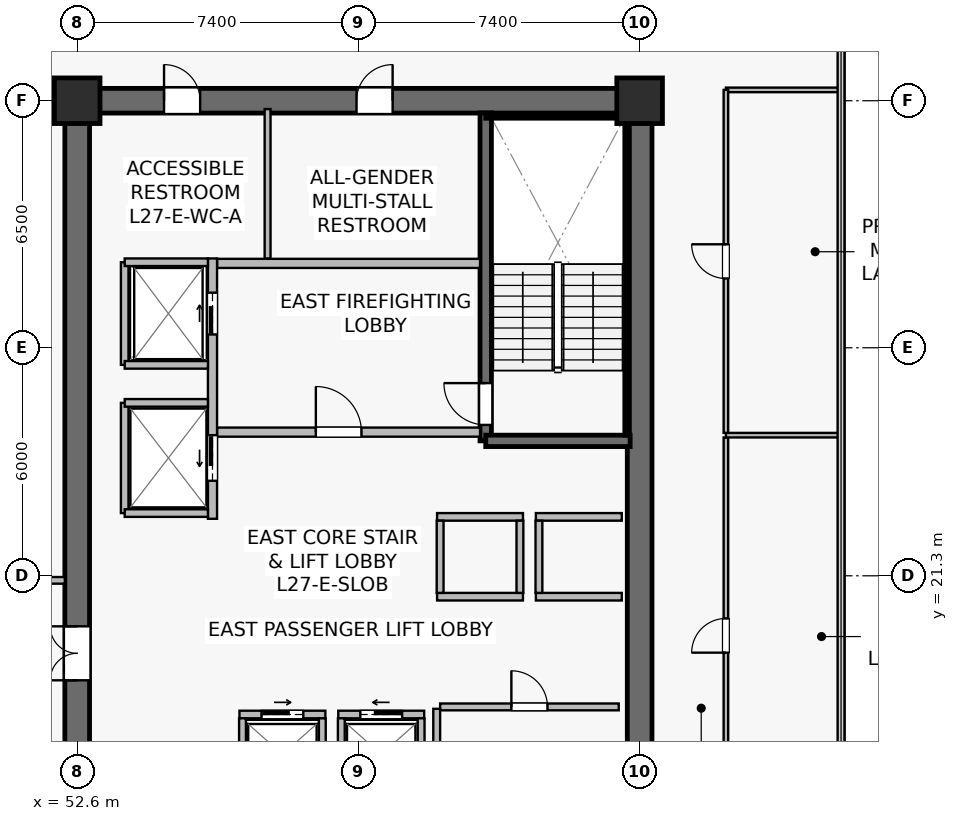
"""IFC4 building model, lengths in metres.
Left out: names, types, materials, properties, quantities, classifications, styles, units other than length and angle.
Written with IfcOpenShell. Run it as: python <this file> out.ifc"""

import sys

from ifc_helpers import new_model, si_unit, direction, frame, frame_2d, origin, origin_2d, place, context, subcontext, project, spatial, rectangle, extrude, source, transform, mapped, element, fill, save


model = new_model("IFC4")
c1 = context("Model", 3, precision=1e-05, world=origin(), true_north=direction((0.0, 1.0)))
c2 = subcontext(c1, "Body", "Model", "MODEL_VIEW")
j1 = project(units=[si_unit("LENGTHUNIT", "METRE"), si_unit("PLANEANGLEUNIT", "RADIAN")], contexts=[c1])
p1 = place(None, origin())
s1 = spatial("IfcSite", under=j1, at=p1, CompositionType="ELEMENT")
p2 = place(p1, origin())
s2 = spatial("IfcBuilding", under=s1, at=p2, CompositionType="ELEMENT")
p3 = place(p2, frame((0.0, 0.0, 113.3)))
s3 = spatial("IfcBuildingStorey", under=s2, at=p3, CompositionType="ELEMENT", Elevation=113.3)
p4 = place(p3, frame((52.275, 33.8, 0.0), z_axis=(0.0, 0.0, 1.0), x_axis=(1.0, 0.0, 0.0)))
e1 = element("IfcWall", 1, at=p4, inside=s3, PredefinedType="SHEAR", context=c2, shape_type="SweptSolid", body=[
    extrude(rectangle(XDim=15.45, YDim=0.65, at=frame_2d((7.725, 0.0))), origin(), (0.0, 0.0, 1.0), 3.79),
])
p5 = place(p4, frame((7.675, 0.0, 0.0)))
e2 = element("IfcOpeningElement", 2, at=p5, cuts=e1, PredefinedType="OPENING", context=c2, shape_type="SweptSolid", body=[
    extrude(rectangle(XDim=0.95, YDim=2.15, at=frame_2d((0.475, 1.075))), frame((0.0, 0.335, 0.0), z_axis=(0.0, -1.0, 0.0), x_axis=(1.0, 0.0, 0.0)), (0.0, 0.0, 1.0), 0.67),
])
p6 = place(p4, frame((2.61, 0.0, 0.0)))
e3 = element("IfcOpeningElement", 3, at=p6, cuts=e1, PredefinedType="OPENING", context=c2, shape_type="SweptSolid", body=[
    extrude(rectangle(XDim=0.95, YDim=2.15, at=frame_2d((0.475, 1.075))), frame((0.0, 0.335, 0.0), z_axis=(0.0, -1.0, 0.0), x_axis=(1.0, 0.0, 0.0)), (0.0, 0.0, 1.0), 0.67),
])
p7 = place(p3, frame((52.6, 15.125, 0.0), z_axis=(0.0, 0.0, 1.0), x_axis=(0.0, 1.0, 0.0)))
e4 = element("IfcWall", 4, at=p7, inside=s3, PredefinedType="SHEAR", context=c2, shape_type="SweptSolid", body=[
    extrude(rectangle(XDim=18.35, YDim=0.65, at=frame_2d((9.175, 0.0))), origin(), (0.0, 0.0, 1.0), 3.79),
])
p8 = place(p7, frame((3.425, 0.0, 0.0)))
e5 = element("IfcOpeningElement", 5, at=p8, cuts=e4, PredefinedType="OPENING", context=c2, shape_type="SweptSolid", body=[
    extrude(rectangle(XDim=1.42, YDim=2.2, at=frame_2d((0.71, 1.1))), frame((0.0, 0.335, 0.0), z_axis=(0.0, -1.0, 0.0), x_axis=(1.0, 0.0, 0.0)), (0.0, 0.0, 1.0), 0.67),
])
p9 = place(p3, frame((67.4, 15.125, 0.0), z_axis=(0.0, 0.0, 1.0), x_axis=(0.0, 1.0, 0.0)))
e6 = element("IfcWall", 6, at=p9, inside=s3, PredefinedType="SHEAR", context=c2, shape_type="SweptSolid", body=[
    extrude(rectangle(XDim=18.35, YDim=0.65, at=frame_2d((9.175, 0.0))), origin(), (0.0, 0.0, 1.0), 3.79),
])
p10 = place(p3, frame((63.35, 24.85, 0.0), z_axis=(0.0, 0.0, 1.0), x_axis=(0.0, 1.0, 0.0)))
e7 = element("IfcWall", 7, at=p10, inside=s3, PredefinedType="SHEAR", context=c2, shape_type="SweptSolid", body=[
    extrude(rectangle(XDim=8.63, YDim=0.3, at=frame_2d((4.315, 0.0))), origin(), (0.0, 0.0, 1.0), 3.79),
])
p11 = place(p10, frame((0.42, 0.0, 0.0)))
e8 = element("IfcOpeningElement", 8, at=p11, cuts=e7, PredefinedType="OPENING", context=c2, shape_type="SweptSolid", body=[
    extrude(rectangle(XDim=1.1, YDim=2.15, at=frame_2d((0.55, 1.075))), frame((0.0, 0.16, 0.0), z_axis=(0.0, -1.0, 0.0), x_axis=(1.0, 0.0, 0.0)), (0.0, 0.0, 1.0), 0.32),
])
p12 = place(p3, frame((63.35, 24.85, 0.0), z_axis=(0.0, 0.0, 1.0), x_axis=(1.0, 0.0, 0.0)))
e9 = element("IfcWall", 9, at=p12, inside=s3, PredefinedType="SHEAR", context=c2, shape_type="SweptSolid", body=[
    extrude(rectangle(XDim=3.8, YDim=0.3, at=frame_2d((1.9, 0.0))), origin(), (0.0, 0.0, 1.0), 3.79),
])
p13 = place(p3, frame((63.35, 33.4, 0.0), z_axis=(0.0, 0.0, 1.0), x_axis=(1.0, 0.0, 0.0)))
e10 = element("IfcWall", 10, at=p13, inside=s3, PredefinedType="SOLIDWALL", context=c2, shape_type="SweptSolid", body=[
    extrude(rectangle(XDim=3.72, YDim=0.12, at=frame_2d((1.86, 0.0))), origin(), (0.0, 0.0, 1.0), 3.79),
])
p14 = place(p3, frame((67.07, 25.0, 0.0), z_axis=(0.0, 0.0, 1.0), x_axis=(0.0, 1.0, 0.0)))
e11 = element("IfcWall", 11, at=p14, inside=s3, PredefinedType="SOLIDWALL", context=c2, shape_type="SweptSolid", body=[
    extrude(rectangle(XDim=8.32, YDim=0.12, at=frame_2d((4.16, 0.0))), origin(), (0.0, 0.0, 1.0), 3.79),
])
m1 = source(origin(), c2, "Body", "SweptSolid", [
    extrude(rectangle(XDim=1.2, YDim=1.2, at=origin_2d()), origin(), (0.0, 0.0, 1.0), 4.1),
])
for number, where, z_axis, x_axis in (
    (12, (52.6, 33.8, 0.0), (0.0, 0.0, 1.0), (1.0, 0.0, 0.0)),
    (13, (67.4, 33.8, 0.0), (0.0, 0.0, 1.0), (1.0, 0.0, 0.0)),
):
    element("IfcColumn", number, at=place(p3, frame(where, z_axis=z_axis, x_axis=x_axis)), inside=s3, PredefinedType="COLUMN", context=c2, shape_type="MappedRepresentation", body=[
        mapped(m1, transform((0.0, 0.0, 0.0), scale=1.0)),
    ])
p15 = place(p3, frame((56.28, 25.08, 0.0), z_axis=(0.0, 0.0, 1.0), x_axis=(1.0, 0.0, 0.0)))
e14 = element("IfcWall", 14, at=p15, inside=s3, PredefinedType="SOLIDWALL", context=c2, shape_type="SweptSolid", body=[
    extrude(rectangle(XDim=6.92, YDim=0.24, at=frame_2d((3.46, 0.0))), origin(), (0.0, 0.0, 1.0), 3.125),
])
p16 = place(p15, frame((2.6, 0.0, 0.0)))
e15 = element("IfcOpeningElement", 15, at=p16, cuts=e14, PredefinedType="OPENING", context=c2, shape_type="SweptSolid", body=[
    extrude(rectangle(XDim=1.2, YDim=2.16, at=frame_2d((0.6, 1.08))), frame((0.0, 0.13, 0.0), z_axis=(0.0, -1.0, 0.0), x_axis=(1.0, 0.0, 0.0)), (0.0, 0.0, 1.0), 0.26),
])
p17 = place(p3, frame((56.28, 29.52, 0.0), z_axis=(0.0, 0.0, 1.0), x_axis=(1.0, 0.0, 0.0)))
e16 = element("IfcWall", 16, at=p17, inside=s3, PredefinedType="SOLIDWALL", context=c2, shape_type="SweptSolid", body=[
    extrude(rectangle(XDim=6.92, YDim=0.24, at=frame_2d((3.46, 0.0))), origin(), (0.0, 0.0, 1.0), 3.125),
])
p18 = place(p3, frame((56.16, 22.8, 0.0), z_axis=(0.0, 0.0, 1.0), x_axis=(0.0, 1.0, 0.0)))
e17 = element("IfcWall", 17, at=p18, inside=s3, PredefinedType="SOLIDWALL", context=c2, shape_type="SweptSolid", body=[
    extrude(rectangle(XDim=6.85, YDim=0.24, at=frame_2d((3.425, 0.0))), origin(), (0.0, 0.0, 1.0), 2.875),
])
p19 = place(p18, frame((4.85, 0.0, 0.0)))
e18 = element("IfcOpeningElement", 18, at=p19, cuts=e17, PredefinedType="OPENING", context=c2, shape_type="SweptSolid", body=[
    extrude(rectangle(XDim=1.1, YDim=2.22, at=frame_2d((0.55, 1.11))), frame((0.0, 0.13, 0.0), z_axis=(0.0, -1.0, 0.0), x_axis=(1.0, 0.0, 0.0)), (0.0, 0.0, 1.0), 0.26),
])
p20 = place(p18, frame((1.0, 0.0, 0.0)))
e19 = element("IfcOpeningElement", 19, at=p20, cuts=e17, PredefinedType="OPENING", context=c2, shape_type="SweptSolid", body=[
    extrude(rectangle(XDim=1.2, YDim=2.22, at=frame_2d((0.6, 1.11))), frame((0.0, 0.13, 0.0), z_axis=(0.0, -1.0, 0.0), x_axis=(1.0, 0.0, 0.0)), (0.0, 0.0, 1.0), 0.26),
])
p21 = place(p3, frame((59.47, 17.65, 0.0), z_axis=(0.0, 0.0, 1.0), x_axis=(1.0, 0.0, 0.0)))
e20 = element("IfcWall", 20, at=p21, inside=s3, PredefinedType="SOLIDWALL", context=c2, shape_type="SweptSolid", body=[
    extrude(rectangle(XDim=2.26, YDim=0.2, at=frame_2d((1.13, 0.0))), origin(), (0.0, 0.0, 1.0), 3.125),
])
p22 = place(p21, frame((0.58, 0.0, 0.0)))
e21 = element("IfcOpeningElement", 21, at=p22, cuts=e20, PredefinedType="OPENING", context=c2, shape_type="SweptSolid", body=[
    extrude(rectangle(XDim=1.1, YDim=2.22, at=frame_2d((0.55, 1.11))), frame((0.0, 0.11, 0.0), z_axis=(0.0, -1.0, 0.0), x_axis=(1.0, 0.0, 0.0)), (0.0, 0.0, 1.0), 0.22),
])
for number, where, z_axis, x_axis in (
    (22, (59.55, 15.65, 0.0), (0.0, 0.0, 1.0), (0.0, 1.0, 0.0)),
    (23, (61.65, 15.65, 0.0), (0.0, 0.0, 1.0), (0.0, 1.0, 0.0)),
):
    element("IfcWall", number, at=place(p3, frame(where, z_axis=z_axis, x_axis=x_axis)), inside=s3, PredefinedType="SOLIDWALL", context=c2, shape_type="SweptSolid", body=[
        extrude(rectangle(XDim=1.9, YDim=0.18, at=frame_2d((0.95, 0.0))), origin(), (0.0, 0.0, 1.0), 3.79),
    ])
p23 = place(p3, frame((56.87, 17.65, 0.0), z_axis=(0.0, 0.0, 1.0), x_axis=(1.0, 0.0, 0.0)))
e24 = element("IfcWall", 24, at=p23, inside=s3, PredefinedType="SOLIDWALL", context=c2, shape_type="SweptSolid", body=[
    extrude(rectangle(XDim=2.26, YDim=0.2, at=frame_2d((1.13, 0.0))), origin(), (0.0, 0.0, 1.0), 3.79),
])
p24 = place(p23, frame((0.58, 0.0, 0.0)))
e25 = element("IfcOpeningElement", 25, at=p24, cuts=e24, PredefinedType="OPENING", context=c2, shape_type="SweptSolid", body=[
    extrude(rectangle(XDim=1.1, YDim=2.22, at=frame_2d((0.55, 1.11))), frame((0.0, 0.11, 0.0), z_axis=(0.0, -1.0, 0.0), x_axis=(1.0, 0.0, 0.0)), (0.0, 0.0, 1.0), 0.22),
])
for number, where, z_axis, x_axis in (
    (26, (56.95, 15.65, 0.0), (0.0, 0.0, 1.0), (0.0, 1.0, 0.0)),
    (27, (59.05, 15.65, 0.0), (0.0, 0.0, 1.0), (0.0, 1.0, 0.0)),
):
    element("IfcWall", number, at=place(p3, frame(where, z_axis=z_axis, x_axis=x_axis)), inside=s3, PredefinedType="SOLIDWALL", context=c2, shape_type="SweptSolid", body=[
        extrude(rectangle(XDim=1.9, YDim=0.18, at=frame_2d((0.95, 0.0))), origin(), (0.0, 0.0, 1.0), 3.79),
    ])
for number, where, z_axis, x_axis in (
    (28, (64.67, 20.75, 0.0), (0.0, 0.0, 1.0), (1.0, 0.0, 0.0)),
    (29, (64.67, 22.85, 0.0), (0.0, 0.0, 1.0), (1.0, 0.0, 0.0)),
):
    element("IfcWall", number, at=place(p3, frame(where, z_axis=z_axis, x_axis=x_axis)), inside=s3, PredefinedType="SOLIDWALL", context=c2, shape_type="SweptSolid", body=[
        extrude(rectangle(XDim=2.26, YDim=0.2, at=frame_2d((1.13, 0.0))), origin(), (0.0, 0.0, 1.0), 3.79),
    ])
p25 = place(p3, frame((64.75, 20.85, 0.0), z_axis=(0.0, 0.0, 1.0), x_axis=(0.0, 1.0, 0.0)))
e30 = element("IfcWall", 30, at=p25, inside=s3, PredefinedType="SOLIDWALL", context=c2, shape_type="SweptSolid", body=[
    extrude(rectangle(XDim=1.9, YDim=0.18, at=frame_2d((0.95, 0.0))), origin(), (0.0, 0.0, 1.0), 3.79),
])
for number, where, z_axis, x_axis in (
    (31, (62.07, 20.75, 0.0), (0.0, 0.0, 1.0), (1.0, 0.0, 0.0)),
    (32, (62.07, 22.85, 0.0), (0.0, 0.0, 1.0), (1.0, 0.0, 0.0)),
):
    element("IfcWall", number, at=place(p3, frame(where, z_axis=z_axis, x_axis=x_axis)), inside=s3, PredefinedType="SOLIDWALL", context=c2, shape_type="SweptSolid", body=[
        extrude(rectangle(XDim=2.26, YDim=0.2, at=frame_2d((1.13, 0.0))), origin(), (0.0, 0.0, 1.0), 3.79),
    ])
for number, where, z_axis, x_axis in (
    (33, (62.15, 20.85, 0.0), (0.0, 0.0, 1.0), (0.0, 1.0, 0.0)),
    (34, (64.25, 20.85, 0.0), (0.0, 0.0, 1.0), (0.0, 1.0, 0.0)),
):
    element("IfcWall", number, at=place(p3, frame(where, z_axis=z_axis, x_axis=x_axis)), inside=s3, PredefinedType="SOLIDWALL", context=c2, shape_type="SweptSolid", body=[
        extrude(rectangle(XDim=1.9, YDim=0.18, at=frame_2d((0.95, 0.0))), origin(), (0.0, 0.0, 1.0), 3.79),
    ])
p26 = place(p3, frame((53.85, 26.85, 0.0), z_axis=(0.0, 0.0, 1.0), x_axis=(0.0, 1.0, 0.0)))
e35 = element("IfcWall", 35, at=p26, inside=s3, PredefinedType="SOLIDWALL", context=c2, shape_type="SweptSolid", body=[
    extrude(rectangle(XDim=2.7, YDim=0.2, at=frame_2d((1.35, 0.0))), origin(), (0.0, 0.0, 1.0), 3.79),
])
p27 = place(p3, frame((53.85, 29.55, 0.0), z_axis=(0.0, 0.0, 1.0), x_axis=(1.0, 0.0, 0.0)))
e36 = element("IfcWall", 36, at=p27, inside=s3, PredefinedType="SOLIDWALL", context=c2, shape_type="SweptSolid", body=[
    extrude(rectangle(XDim=2.19, YDim=0.2, at=frame_2d((1.095, 0.0))), origin(), (0.0, 0.0, 1.0), 3.79),
])
p28 = place(p3, frame((53.85, 26.85, 0.0), z_axis=(0.0, 0.0, 1.0), x_axis=(1.0, 0.0, 0.0)))
e37 = element("IfcWall", 37, at=p28, inside=s3, PredefinedType="SOLIDWALL", context=c2, shape_type="SweptSolid", body=[
    extrude(rectangle(XDim=2.19, YDim=0.2, at=frame_2d((1.095, 0.0))), origin(), (0.0, 0.0, 1.0), 3.187),
])
p29 = place(p3, frame((53.85, 22.95, 0.0), z_axis=(0.0, 0.0, 1.0), x_axis=(0.0, 1.0, 0.0)))
e38 = element("IfcWall", 38, at=p29, inside=s3, PredefinedType="SOLIDWALL", context=c2, shape_type="SweptSolid", body=[
    extrude(rectangle(XDim=2.9, YDim=0.2, at=frame_2d((1.45, 0.0))), origin(), (0.0, 0.0, 1.0), 2.875),
])
for number, where, z_axis, x_axis in (
    (39, (53.85, 25.85, 0.0), (0.0, 0.0, 1.0), (1.0, 0.0, 0.0)),
    (40, (53.85, 22.95, 0.0), (0.0, 0.0, 1.0), (1.0, 0.0, 0.0)),
):
    element("IfcWall", number, at=place(p3, frame(where, z_axis=z_axis, x_axis=x_axis)), inside=s3, PredefinedType="SOLIDWALL", context=c2, shape_type="SweptSolid", body=[
        extrude(rectangle(XDim=2.19, YDim=0.2, at=frame_2d((1.095, 0.0))), origin(), (0.0, 0.0, 1.0), 3.79),
    ])
p30 = place(p3, frame((62.15, 17.85, 0.0), z_axis=(0.0, 0.0, 1.0), x_axis=(1.0, 0.0, 0.0)))
e41 = element("IfcWall", 41, at=p30, inside=s3, PredefinedType="SOLIDWALL", context=c2, shape_type="SweptSolid", body=[
    extrude(rectangle(XDim=4.7, YDim=0.18, at=frame_2d((2.35, 0.0))), origin(), (0.0, 0.0, 1.0), 3.79),
])
p31 = place(p30, frame((1.875, 0.0, 0.0)))
e42 = element("IfcOpeningElement", 42, at=p31, cuts=e41, PredefinedType="OPENING", context=c2, shape_type="SweptSolid", body=[
    extrude(rectangle(XDim=0.95, YDim=2.15, at=frame_2d((0.475, 1.075))), frame((0.0, 0.1, 0.0), z_axis=(0.0, -1.0, 0.0), x_axis=(1.0, 0.0, 0.0)), (0.0, 0.0, 1.0), 0.2),
])
p32 = place(p3, frame((62.06, 15.4, 0.0), z_axis=(0.0, 0.0, 1.0), x_axis=(0.0, 1.0, 0.0)))
e43 = element("IfcWall", 43, at=p32, inside=s3, PredefinedType="SOLIDWALL", context=c2, shape_type="SweptSolid", body=[
    extrude(rectangle(XDim=2.4, YDim=0.18, at=frame_2d((1.2, 0.0))), origin(), (0.0, 0.0, 1.0), 3.79),
])
p33 = place(p3, frame((57.61, 29.65, 0.0), z_axis=(0.0, 0.0, 1.0), x_axis=(0.0, 1.0, 0.0)))
e44 = element("IfcWall", 44, at=p33, inside=s3, PredefinedType="PLUMBINGWALL", context=c2, shape_type="SweptSolid", body=[
    extrude(rectangle(XDim=3.93, YDim=0.155, at=frame_2d((1.965, 0.0))), origin(), (0.0, 0.0, 1.0), 3.79),
])
p34 = place(p3, frame((48.3, 34.26, 0.0), z_axis=(0.0, 0.0, 1.0), x_axis=(1.0, 0.0, 0.0)))
e45 = element("IfcWall", 45, at=p34, inside=s3, PredefinedType="PARTITIONING", context=c2, shape_type="SweptSolid", body=[
    extrude(rectangle(XDim=3.975, YDim=0.175, at=frame_2d((1.987, 0.0))), origin(), (0.0, 0.0, 1.0), 3.475),
])
p35 = place(p3, frame((48.3, 21.18, 0.0), z_axis=(0.0, 0.0, 1.0), x_axis=(1.0, 0.0, 0.0)))
e46 = element("IfcWall", 46, at=p35, inside=s3, PredefinedType="PARTITIONING", context=c2, shape_type="SweptSolid", body=[
    extrude(rectangle(XDim=3.975, YDim=0.175, at=frame_2d((1.987, 0.0))), origin(), (0.0, 0.0, 1.0), 3.79),
])
p36 = place(p35, frame((1.35, 0.0, 0.0)))
e47 = element("IfcOpeningElement", 47, at=p36, cuts=e46, PredefinedType="OPENING", context=c2, shape_type="SweptSolid", body=[
    extrude(rectangle(XDim=0.95, YDim=2.15, at=frame_2d((0.475, 1.075))), frame((0.0, 0.098, 0.0), z_axis=(0.0, -1.0, 0.0), x_axis=(1.0, 0.0, 0.0)), (0.0, 0.0, 1.0), 0.195),
])
p37 = place(p3, frame((69.67, 34.085, 0.0), z_axis=(0.0, 0.0, 1.0), x_axis=(1.0, 0.0, 0.0)))
e48 = element("IfcWall", 48, at=p37, inside=s3, PredefinedType="PARTITIONING", context=c2, shape_type="SweptSolid", body=[
    extrude(rectangle(XDim=3.02, YDim=0.12, at=frame_2d((1.51, 0.0))), origin(), (0.0, 0.0, 1.0), 3.79),
])
p38 = place(p3, frame((69.67, 14.515, 0.0), z_axis=(0.0, 0.0, 1.0), x_axis=(0.0, 1.0, 0.0)))
e49 = element("IfcWall", 49, at=p38, inside=s3, PredefinedType="PARTITIONING", context=c2, shape_type="SweptSolid", body=[
    extrude(rectangle(XDim=10.425, YDim=0.12, at=frame_2d((5.212, 0.0))), origin(), (0.0, 0.0, 1.0), 3.79),
])
p39 = place(p38, frame((4.762, 0.0, 0.0)))
e50 = element("IfcOpeningElement", 50, at=p39, cuts=e49, PredefinedType="OPENING", context=c2, shape_type="SweptSolid", body=[
    extrude(rectangle(XDim=0.9, YDim=2.1, at=frame_2d((0.45, 1.05))), frame((0.0, 0.07, 0.0), z_axis=(0.0, -1.0, 0.0), x_axis=(1.0, 0.0, 0.0)), (0.0, 0.0, 1.0), 0.14),
])
p40 = place(p3, frame((69.67, 25.0, 0.0), z_axis=(0.0, 0.0, 1.0), x_axis=(1.0, 0.0, 0.0)))
e51 = element("IfcWall", 51, at=p40, inside=s3, PredefinedType="PARTITIONING", context=c2, shape_type="SweptSolid", body=[
    extrude(rectangle(XDim=3.02, YDim=0.12, at=frame_2d((1.51, 0.0))), origin(), (0.0, 0.0, 1.0), 3.79),
])
p41 = place(p3, frame((69.67, 25.06, 0.0), z_axis=(0.0, 0.0, 1.0), x_axis=(0.0, 1.0, 0.0)))
e52 = element("IfcWall", 52, at=p41, inside=s3, PredefinedType="PARTITIONING", context=c2, shape_type="SweptSolid", body=[
    extrude(rectangle(XDim=9.025, YDim=0.12, at=frame_2d((4.512, 0.0))), origin(), (0.0, 0.0, 1.0), 3.79),
])
p42 = place(p41, frame((4.062, 0.0, 0.0)))
e53 = element("IfcOpeningElement", 53, at=p42, cuts=e52, PredefinedType="OPENING", context=c2, shape_type="SweptSolid", body=[
    extrude(rectangle(XDim=0.9, YDim=2.1, at=frame_2d((0.45, 1.05))), frame((0.0, 0.07, 0.0), z_axis=(0.0, -1.0, 0.0), x_axis=(1.0, 0.0, 0.0)), (0.0, 0.0, 1.0), 0.14),
])
m2 = source(origin(), c2, "Body", "SweptSolid", [
    extrude(rectangle(XDim=1.1, YDim=2.15, at=frame_2d((0.55, 1.075))), frame((0.0, 0.025, 0.0), z_axis=(0.0, -1.0, 0.0), x_axis=(1.0, 0.0, 0.0)), (0.0, 0.0, 1.0), 0.05),
])
p43 = place(p11, origin())
e54 = element("IfcDoor", 54, at=p43, inside=s3, OperationType="SINGLE_SWING_RIGHT", PredefinedType="DOOR", context=c2, shape_type="MappedRepresentation", body=[
    mapped(m2, transform((0.0, 0.0, 0.0), scale=1.0)),
])
fill(e8, e54)
m3 = source(origin(), c2, "Body", "SweptSolid", [
    extrude(rectangle(XDim=1.2, YDim=2.16, at=frame_2d((0.6, 1.08))), frame((0.0, 0.025, 0.0), z_axis=(0.0, -1.0, 0.0), x_axis=(1.0, 0.0, 0.0)), (0.0, 0.0, 1.0), 0.05),
])
p44 = place(p16, origin())
e55 = element("IfcDoor", 55, at=p44, inside=s3, OperationType="SINGLE_SWING_LEFT", PredefinedType="DOOR", context=c2, shape_type="MappedRepresentation", body=[
    mapped(m3, transform((0.0, 0.0, 0.0), scale=1.0)),
])
fill(e15, e55)
m4 = source(origin(), c2, "Body", "SweptSolid", [
    extrude(rectangle(XDim=1.1, YDim=2.22, at=frame_2d((0.55, 1.11))), frame((0.0, 0.025, 0.0), z_axis=(0.0, -1.0, 0.0), x_axis=(1.0, 0.0, 0.0)), (0.0, 0.0, 1.0), 0.05),
])
p45 = place(p22, origin())
e56 = element("IfcDoor", 56, at=p45, inside=s3, OperationType="SLIDING_TO_LEFT", PredefinedType="USERDEFINED", context=c2, shape_type="MappedRepresentation", body=[
    mapped(m4, transform((0.0, 0.0, 0.0), scale=1.0)),
])
fill(e21, e56)
p46 = place(p24, origin())
e57 = element("IfcDoor", 57, at=p46, inside=s3, OperationType="SLIDING_TO_RIGHT", PredefinedType="USERDEFINED", context=c2, shape_type="MappedRepresentation", body=[
    mapped(m4, transform((0.0, 0.0, 0.0), scale=1.0)),
])
fill(e25, e57)
p47 = place(p19, origin())
e58 = element("IfcDoor", 58, at=p47, inside=s3, OperationType="SLIDING_TO_RIGHT", PredefinedType="USERDEFINED", context=c2, shape_type="MappedRepresentation", body=[
    mapped(m4, transform((0.0, 0.0, 0.0), scale=1.0)),
])
fill(e18, e58)
m5 = source(origin(), c2, "Body", "SweptSolid", [
    extrude(rectangle(XDim=1.2, YDim=2.22, at=frame_2d((0.6, 1.11))), frame((0.0, 0.025, 0.0), z_axis=(0.0, -1.0, 0.0), x_axis=(1.0, 0.0, 0.0)), (0.0, 0.0, 1.0), 0.05),
])
p48 = place(p20, origin())
e59 = element("IfcDoor", 59, at=p48, inside=s3, OperationType="SLIDING_TO_LEFT", PredefinedType="USERDEFINED", context=c2, shape_type="MappedRepresentation", body=[
    mapped(m5, transform((0.0, 0.0, 0.0), scale=1.0)),
])
fill(e19, e59)
m6 = source(origin(), c2, "Body", "SweptSolid", [
    extrude(rectangle(XDim=0.95, YDim=2.15, at=frame_2d((0.475, 1.075))), frame((0.0, 0.025, 0.0), z_axis=(0.0, -1.0, 0.0), x_axis=(1.0, 0.0, 0.0)), (0.0, 0.0, 1.0), 0.05),
])
p49 = place(p31, origin())
e60 = element("IfcDoor", 60, at=p49, inside=s3, OperationType="SINGLE_SWING_LEFT", PredefinedType="DOOR", context=c2, shape_type="MappedRepresentation", body=[
    mapped(m6, transform((0.0, 0.0, 0.0), scale=1.0)),
])
fill(e42, e60)
m7 = source(origin(), c2, "Body", "SweptSolid", [
    extrude(rectangle(XDim=1.42, YDim=2.2, at=frame_2d((0.71, 1.1))), frame((0.0, 0.025, 0.0), z_axis=(0.0, -1.0, 0.0), x_axis=(1.0, 0.0, 0.0)), (0.0, 0.0, 1.0), 0.05),
])
p50 = place(p8, origin())
e61 = element("IfcDoor", 61, at=p50, inside=s3, OperationType="DOUBLE_DOOR_SINGLE_SWING", PredefinedType="DOOR", context=c2, shape_type="MappedRepresentation", body=[
    mapped(m7, transform((0.0, 0.0, 0.0), scale=1.0)),
])
fill(e5, e61)
p51 = place(p5, origin())
e62 = element("IfcDoor", 62, at=p51, inside=s3, OperationType="SINGLE_SWING_RIGHT", PredefinedType="DOOR", context=c2, shape_type="MappedRepresentation", body=[
    mapped(m6, transform((0.0, 0.0, 0.0), scale=1.0)),
])
fill(e2, e62)
p52 = place(p6, origin())
e63 = element("IfcDoor", 63, at=p52, inside=s3, OperationType="SINGLE_SWING_LEFT", PredefinedType="DOOR", context=c2, shape_type="MappedRepresentation", body=[
    mapped(m6, transform((0.0, 0.0, 0.0), scale=1.0)),
])
fill(e3, e63)
m8 = source(origin(), c2, "Body", "SweptSolid", [
    extrude(rectangle(XDim=0.9, YDim=2.1, at=frame_2d((0.45, 1.05))), frame((0.0, 0.025, 0.0), z_axis=(0.0, -1.0, 0.0), x_axis=(1.0, 0.0, 0.0)), (0.0, 0.0, 1.0), 0.05),
])
p53 = place(p39, origin())
e64 = element("IfcDoor", 64, at=p53, inside=s3, OperationType="SINGLE_SWING_LEFT", PredefinedType="DOOR", context=c2, shape_type="MappedRepresentation", body=[
    mapped(m8, transform((0.0, 0.0, 0.0), scale=1.0)),
])
fill(e50, e64)
p54 = place(p42, origin())
e65 = element("IfcDoor", 65, at=p54, inside=s3, OperationType="SINGLE_SWING_RIGHT", PredefinedType="DOOR", context=c2, shape_type="MappedRepresentation", body=[
    mapped(m8, transform((0.0, 0.0, 0.0), scale=1.0)),
])
fill(e53, e65)
save(model, sys.argv[1])
